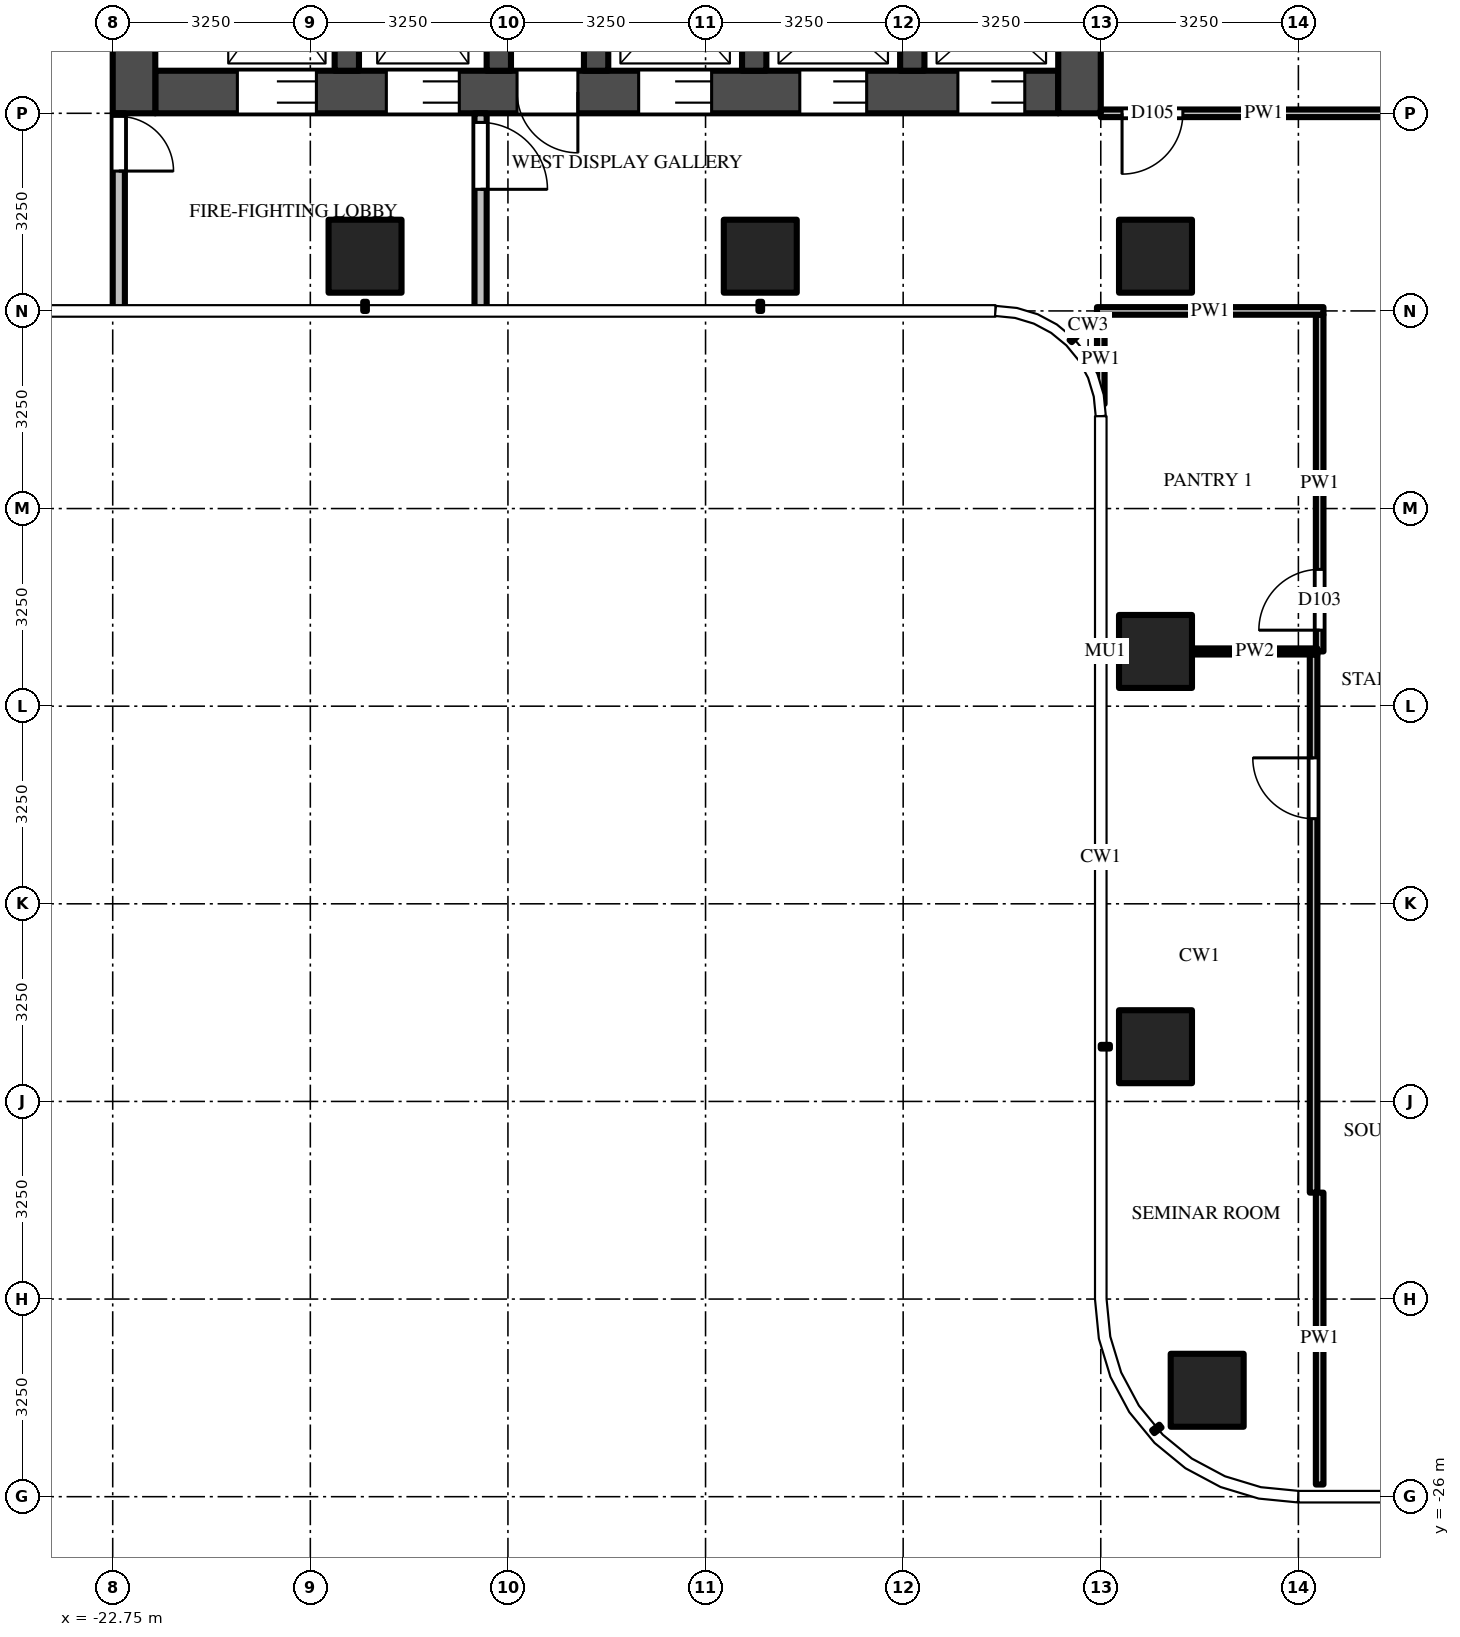
"""IFC4 building model, lengths in metres.
Left out: names, types, materials, properties, quantities, classifications, styles, units other than length and angle.
Written with IfcOpenShell. Run it as: python <this file> out.ifc"""

import sys

from ifc_helpers import new_model, si_unit, direction, frame, frame_2d, origin, origin_2d, place, context, subcontext, project, spatial, rectangle, extrude, source, transform, mapped, element, fill, save


model = new_model("IFC4")
c1 = context("Model", 3, precision=1e-05, world=origin(), true_north=direction((0.0, 1.0)))
c2 = subcontext(c1, "Body", "Model", "MODEL_VIEW")
j1 = project(units=[si_unit("LENGTHUNIT", "METRE"), si_unit("PLANEANGLEUNIT", "RADIAN")], contexts=[c1])
p1 = place(None, origin())
s1 = spatial("IfcSite", under=j1, at=p1, CompositionType="ELEMENT")
p2 = place(p1, origin())
s2 = spatial("IfcBuilding", under=s1, at=p2, CompositionType="ELEMENT")
p3 = place(p2, frame((0.0, 0.0, 165.9)))
s3 = spatial("IfcBuildingStorey", under=s2, at=p3, CompositionType="ELEMENT", Elevation=165.9)
m1 = source(origin(), c2, "Body", "SweptSolid", [
    extrude(rectangle(XDim=1.2, YDim=1.2, at=origin_2d()), origin(), (0.0, 0.0, 1.0), 3.9),
])
for number, where, z_axis, x_axis in (
    (1, (-5.6, -5.6, 0.0), (0.0, 0.0, 1.0), (1.0, 0.0, 0.0)),
    (2, (-5.6, -12.1, 0.0), (0.0, 0.0, 1.0), (1.0, 0.0, 0.0)),
    (3, (-5.6, -18.6, 0.0), (0.0, 0.0, 1.0), (1.0, 0.0, 0.0)),
    (4, (-4.75, -24.25, 0.0), (0.0, 0.0, 1.0), (1.0, 0.0, 0.0)),
    (5, (-12.1, -5.6, 0.0), (0.0, 0.0, 1.0), (1.0, 0.0, 0.0)),
    (6, (-18.6, -5.6, 0.0), (0.0, 0.0, 1.0), (1.0, 0.0, 0.0)),
):
    element("IfcColumn", number, at=place(p3, frame(where, z_axis=z_axis, x_axis=x_axis)), inside=s3, PredefinedType="COLUMN", context=c2, shape_type="MappedRepresentation", body=[
        mapped(m1, transform((0.0, 0.0, 0.0))),
    ])
m2 = source(origin(), c2, "Body", "SweptSolid", [
    extrude(rectangle(XDim=14.85, YDim=0.7, at=frame_2d((7.425, 0.0))), origin(), (0.0, 0.0, 1.0), 3.7),
])
p4 = place(p3, frame((-7.2, -2.9, 0.0), z_axis=(0.0, 0.0, 1.0), x_axis=(-1.0, 0.0, 0.0)))
e7 = element("IfcWall", 7, at=p4, inside=s3, PredefinedType="SHEAR", context=c2, shape_type="MappedRepresentation", body=[
    mapped(m2, transform((0.0, 0.0, 0.0))),
])
m3 = source(origin(), c2, "Body", "SweptSolid", [
    extrude(rectangle(XDim=1.1, YDim=2.1, at=frame_2d((0.55, 1.05))), frame((0.0, 0.36, 0.0), z_axis=(0.0, -1.0, 0.0), x_axis=(1.0, 0.0, 0.0)), (0.0, 0.0, 1.0), 0.72),
])
p5 = place(p4, frame((0.55, 0.0, 0.0)))
e8 = element("IfcOpeningElement", 8, at=p5, cuts=e7, PredefinedType="OPENING", context=c2, shape_type="MappedRepresentation", body=[
    mapped(m3, transform((0.0, 0.0, 0.0))),
])
p6 = place(p4, frame((3.15, 0.0, 0.0)))
e9 = element("IfcOpeningElement", 9, at=p6, cuts=e7, PredefinedType="OPENING", context=c2, shape_type="MappedRepresentation", body=[
    mapped(m3, transform((0.0, 0.0, 0.0))),
])
m4 = source(origin(), c2, "Body", "SweptSolid", [
    extrude(rectangle(XDim=1.2, YDim=2.1, at=frame_2d((0.6, 1.05))), frame((0.0, 0.36, 0.0), z_axis=(0.0, -1.0, 0.0), x_axis=(1.0, 0.0, 0.0)), (0.0, 0.0, 1.0), 0.72),
])
p7 = place(p4, frame((5.7, 0.0, 0.0)))
e10 = element("IfcOpeningElement", 10, at=p7, cuts=e7, PredefinedType="OPENING", context=c2, shape_type="MappedRepresentation", body=[
    mapped(m4, transform((0.0, 0.0, 0.0))),
])
m5 = source(origin(), c2, "Body", "SweptSolid", [
    extrude(rectangle(XDim=1.3, YDim=2.1, at=frame_2d((0.65, 1.05))), frame((0.0, 0.36, 0.0), z_axis=(0.0, -1.0, 0.0), x_axis=(1.0, 0.0, 0.0)), (0.0, 0.0, 1.0), 0.72),
])
p8 = place(p4, frame((12.2, 0.0, 0.0)))
e11 = element("IfcOpeningElement", 11, at=p8, cuts=e7, PredefinedType="OPENING", context=c2, shape_type="MappedRepresentation", body=[
    mapped(m5, transform((0.0, 0.0, 0.0))),
])
p9 = place(p4, frame((9.85, 0.0, 0.0)))
e12 = element("IfcOpeningElement", 12, at=p9, cuts=e7, PredefinedType="OPENING", context=c2, shape_type="MappedRepresentation", body=[
    mapped(m4, transform((0.0, 0.0, 0.0))),
])
m6 = source(origin(), c2, "Body", "SweptSolid", [
    extrude(rectangle(XDim=1.0, YDim=2.1, at=frame_2d((0.5, 1.05))), frame((0.0, 0.36, 0.0), z_axis=(0.0, -1.0, 0.0), x_axis=(1.0, 0.0, 0.0)), (0.0, 0.0, 1.0), 0.72),
])
p10 = place(p4, frame((7.9, 0.0, 0.0)))
e13 = element("IfcOpeningElement", 13, at=p10, cuts=e7, PredefinedType="OPENING", context=c2, shape_type="MappedRepresentation", body=[
    mapped(m6, transform((0.0, 0.0, 0.0))),
])
m7 = source(origin(), c2, "Body", "SweptSolid", [
    extrude(rectangle(XDim=9.05, YDim=0.7, at=frame_2d((4.525, 0.0))), origin(), (0.0, 0.0, 1.0), 3.7),
])
p11 = place(p3, frame((-6.85, 5.8, 0.0), z_axis=(0.0, 0.0, 1.0), x_axis=(0.0, -1.0, 0.0)))
e14 = element("IfcWall", 14, at=p11, inside=s3, PredefinedType="SHEAR", context=c2, shape_type="MappedRepresentation", body=[
    mapped(m7, transform((0.0, 0.0, 0.0))),
])
m8 = source(origin(), c2, "Body", "SweptSolid", [
    extrude(rectangle(XDim=1.8, YDim=2.1, at=frame_2d((0.9, 1.05))), frame((0.0, 0.36, 0.0), z_axis=(0.0, -1.0, 0.0), x_axis=(1.0, 0.0, 0.0)), (0.0, 0.0, 1.0), 0.72),
])
p12 = place(p11, frame((3.15, 0.0, 0.0)))
e15 = element("IfcOpeningElement", 15, at=p12, cuts=e14, PredefinedType="OPENING", context=c2, shape_type="MappedRepresentation", body=[
    mapped(m8, transform((0.0, 0.0, 0.0))),
])
p13 = place(p3, frame((-22.4, 5.8, 0.0), z_axis=(0.0, 0.0, 1.0), x_axis=(0.0, -1.0, 0.0)))
e16 = element("IfcWall", 16, at=p13, inside=s3, PredefinedType="SHEAR", context=c2, shape_type="MappedRepresentation", body=[
    mapped(m7, transform((0.0, 0.0, 0.0))),
])
m9 = source(origin(), c2, "Body", "SweptSolid", [
    extrude(rectangle(XDim=2.45, YDim=0.4, at=frame_2d((1.225, 0.0))), origin(), (0.0, 0.0, 1.0), 3.7),
])
for number, where, z_axis, x_axis in (
    (17, (-9.6, -0.1, 0.0), (0.0, 0.0, 1.0), (0.0, -1.0, 0.0)),
    (18, (-12.2, -0.1, 0.0), (0.0, 0.0, 1.0), (0.0, -1.0, 0.0)),
    (19, (-14.8, -0.1, 0.0), (0.0, 0.0, 1.0), (0.0, -1.0, 0.0)),
    (20, (-16.4, -0.1, 0.0), (0.0, 0.0, 1.0), (0.0, -1.0, 0.0)),
    (21, (-18.9, -0.1, 0.0), (0.0, 0.0, 1.0), (0.0, -1.0, 0.0)),
):
    element("IfcWall", number, at=place(p3, frame(where, z_axis=z_axis, x_axis=x_axis)), inside=s3, PredefinedType="SHEAR", context=c2, shape_type="MappedRepresentation", body=[
        mapped(m9, transform((0.0, 0.0, 0.0))),
    ])
m10 = source(origin(), c2, "Body", "SweptSolid", [
    extrude(rectangle(XDim=3.25, YDim=0.2, at=frame_2d((1.625, 0.0))), origin(), (0.0, 0.0, 1.0), 3.7),
])
p14 = place(p3, frame((-16.7, -3.25, 0.0), z_axis=(0.0, 0.0, 1.0), x_axis=(0.0, -1.0, 0.0)))
e22 = element("IfcWall", 22, at=p14, inside=s3, PredefinedType="PARTITIONING", context=c2, shape_type="MappedRepresentation", body=[
    mapped(m10, transform((0.0, 0.0, 0.0))),
])
m11 = source(origin(), c2, "Body", "SweptSolid", [
    extrude(rectangle(XDim=1.1, YDim=2.1, at=frame_2d((0.55, 1.05))), frame((0.0, 0.11, 0.0), z_axis=(0.0, -1.0, 0.0), x_axis=(1.0, 0.0, 0.0)), (0.0, 0.0, 1.0), 0.22),
])
p15 = place(p14, frame((0.15, 0.0, 0.0)))
e23 = element("IfcOpeningElement", 23, at=p15, cuts=e22, PredefinedType="OPENING", context=c2, shape_type="MappedRepresentation", body=[
    mapped(m11, transform((0.0, 0.0, 0.0))),
])
p16 = place(p3, frame((-22.65, -3.25, 0.0), z_axis=(0.0, 0.0, 1.0), x_axis=(0.0, -1.0, 0.0)))
e24 = element("IfcWall", 24, at=p16, inside=s3, PredefinedType="PARTITIONING", context=c2, shape_type="MappedRepresentation", body=[
    mapped(m10, transform((0.0, 0.0, 0.0))),
])
m12 = source(origin(), c2, "Body", "SweptSolid", [
    extrude(rectangle(XDim=0.9, YDim=2.1, at=frame_2d((0.45, 1.05))), frame((0.0, 0.11, 0.0), z_axis=(0.0, -1.0, 0.0), x_axis=(1.0, 0.0, 0.0)), (0.0, 0.0, 1.0), 0.22),
])
p17 = place(p16, frame((0.05, 0.0, 0.0)))
e25 = element("IfcOpeningElement", 25, at=p17, cuts=e24, PredefinedType="OPENING", context=c2, shape_type="MappedRepresentation", body=[
    mapped(m12, transform((0.0, 0.0, 0.0))),
])
m13 = source(origin(), c2, "Body", "SweptSolid", [
    extrude(rectangle(XDim=1.469, YDim=0.125, at=frame_2d((0.734, 0.0))), origin(), (0.0, 0.0, 1.0), 3.7),
])
p18 = place(p3, frame((-6.5, -6.562, 0.0), z_axis=(0.0, 0.0, 1.0), x_axis=(0.0, -1.0, 0.0)))
e26 = element("IfcWall", 26, at=p18, inside=s3, PredefinedType="PARTITIONING", context=c2, shape_type="MappedRepresentation", body=[
    mapped(m13, transform((0.0, 0.0, 0.0))),
])
m14 = source(origin(), c2, "Body", "SweptSolid", [
    extrude(rectangle(XDim=8.85, YDim=0.125, at=frame_2d((4.425, 0.0))), origin(), (0.0, 0.0, 1.0), 2.997),
])
p19 = place(p3, frame((-3.0, -21.0, 0.0), z_axis=(0.0, 0.0, 1.0), x_axis=(0.0, 1.0, 0.0)))
e27 = element("IfcWall", 27, at=p19, inside=s3, PredefinedType="PARTITIONING", context=c2, shape_type="MappedRepresentation", body=[
    mapped(m14, transform((0.0, 0.0, 0.0))),
])
m15 = source(origin(), c2, "Body", "SweptSolid", [
    extrude(rectangle(XDim=1.0, YDim=2.1, at=frame_2d((0.5, 1.05))), frame((0.0, 0.073, 0.0), z_axis=(0.0, -1.0, 0.0), x_axis=(1.0, 0.0, 0.0)), (0.0, 0.0, 1.0), 0.145),
])
p20 = place(p19, frame((6.15, 0.0, 0.0)))
e28 = element("IfcOpeningElement", 28, at=p20, cuts=e27, PredefinedType="OPENING", context=c2, shape_type="MappedRepresentation", body=[
    mapped(m15, transform((0.0, 0.0, 0.0))),
])
m16 = source(origin(), c2, "Body", "SweptSolid", [
    extrude(rectangle(XDim=4.8, YDim=0.125, at=frame_2d((2.4, 0.0))), origin(), (0.0, 0.0, 1.0), 2.78),
])
p21 = place(p3, frame((-2.9, -25.8, 0.0), z_axis=(0.0, 0.0, 1.0), x_axis=(0.0, 1.0, 0.0)))
e29 = element("IfcWall", 29, at=p21, inside=s3, PredefinedType="PARTITIONING", context=c2, shape_type="MappedRepresentation", body=[
    mapped(m16, transform((0.0, 0.0, 0.0))),
])
m17 = source(origin(), c2, "Body", "SweptSolid", [
    extrude(rectangle(XDim=5.538, YDim=0.125, at=frame_2d((2.769, 0.0))), origin(), (0.0, 0.0, 1.0), 2.997),
])
p22 = place(p3, frame((-2.9, -12.1, 0.0), z_axis=(0.0, 0.0, 1.0), x_axis=(0.0, 1.0, 0.0)))
e30 = element("IfcWall", 30, at=p22, inside=s3, PredefinedType="PARTITIONING", context=c2, shape_type="MappedRepresentation", body=[
    mapped(m17, transform((0.0, 0.0, 0.0))),
])
p23 = place(p22, frame((0.35, 0.0, 0.0)))
e31 = element("IfcOpeningElement", 31, at=p23, cuts=e30, PredefinedType="OPENING", context=c2, shape_type="MappedRepresentation", body=[
    mapped(m15, transform((0.0, 0.0, 0.0))),
])
m18 = source(origin(), c2, "Body", "SweptSolid", [
    extrude(rectangle(XDim=2.062, YDim=0.1, at=frame_2d((1.031, 0.0))), origin(), (0.0, 0.0, 1.0), 2.997),
])
p24 = place(p3, frame((-5.0, -12.1, 0.0), z_axis=(0.0, 0.0, 1.0), x_axis=(1.0, 0.0, 0.0)))
e32 = element("IfcWall", 32, at=p24, inside=s3, PredefinedType="PARTITIONING", context=c2, shape_type="MappedRepresentation", body=[
    mapped(m18, transform((0.0, 0.0, 0.0))),
])
m19 = source(origin(), c2, "Body", "SweptSolid", [
    extrude(rectangle(XDim=3.725, YDim=0.125, at=frame_2d((1.863, 0.0))), origin(), (0.0, 0.0, 1.0), 2.78),
])
p25 = place(p3, frame((-2.837, -6.5, 0.0), z_axis=(0.0, 0.0, 1.0), x_axis=(-1.0, 0.0, 0.0)))
e33 = element("IfcWall", 33, at=p25, inside=s3, PredefinedType="PARTITIONING", context=c2, shape_type="MappedRepresentation", body=[
    mapped(m19, transform((0.0, 0.0, 0.0))),
])
m20 = source(origin(), c2, "Body", "SweptSolid", [
    extrude(rectangle(XDim=5.363, YDim=0.125, at=frame_2d((2.681, 0.0))), origin(), (0.0, 0.0, 1.0), 2.997),
])
p26 = place(p3, frame((-1.137, -3.25, 0.0), z_axis=(0.0, 0.0, 1.0), x_axis=(-1.0, 0.0, 0.0)))
e34 = element("IfcWall", 34, at=p26, inside=s3, PredefinedType="PARTITIONING", context=c2, shape_type="MappedRepresentation", body=[
    mapped(m20, transform((0.0, 0.0, 0.0))),
])
p27 = place(p26, frame((4.012, 0.0, 0.0)))
e35 = element("IfcOpeningElement", 35, at=p27, cuts=e34, PredefinedType="OPENING", context=c2, shape_type="MappedRepresentation", body=[
    mapped(m15, transform((0.0, 0.0, 0.0))),
])
m21 = source(origin(), c2, "Body", "SweptSolid", [
    extrude(rectangle(XDim=1.1, YDim=2.1, at=frame_2d((0.55, 1.05))), frame((0.0, -0.275, 0.0), z_axis=(0.0, -1.0, 0.0), x_axis=(1.0, 0.0, 0.0)), (0.0, 0.0, 1.0), 0.05),
])
p28 = place(p5, origin())
e36 = element("IfcDoor", 36, at=p28, inside=s3, OperationType="DOUBLE_DOOR_SLIDING", PredefinedType="DOOR", context=c2, shape_type="MappedRepresentation", body=[
    mapped(m21, transform((0.0, 0.0, 0.0))),
])
fill(e8, e36)
p29 = place(p6, origin())
e37 = element("IfcDoor", 37, at=p29, inside=s3, OperationType="DOUBLE_DOOR_SLIDING", PredefinedType="DOOR", context=c2, shape_type="MappedRepresentation", body=[
    mapped(m21, transform((0.0, 0.0, 0.0))),
])
fill(e9, e37)
m22 = source(origin(), c2, "Body", "SweptSolid", [
    extrude(rectangle(XDim=1.2, YDim=2.1, at=frame_2d((0.6, 1.05))), frame((0.0, -0.275, 0.0), z_axis=(0.0, -1.0, 0.0), x_axis=(1.0, 0.0, 0.0)), (0.0, 0.0, 1.0), 0.05),
])
p30 = place(p7, origin())
e38 = element("IfcDoor", 38, at=p30, inside=s3, OperationType="DOUBLE_DOOR_SLIDING", PredefinedType="DOOR", context=c2, shape_type="MappedRepresentation", body=[
    mapped(m22, transform((0.0, 0.0, 0.0))),
])
fill(e10, e38)
m23 = source(origin(), c2, "Body", "SweptSolid", [
    extrude(rectangle(XDim=1.3, YDim=2.1, at=frame_2d((0.65, 1.05))), frame((0.0, -0.275, 0.0), z_axis=(0.0, -1.0, 0.0), x_axis=(1.0, 0.0, 0.0)), (0.0, 0.0, 1.0), 0.05),
])
p31 = place(p8, origin())
e39 = element("IfcDoor", 39, at=p31, inside=s3, OperationType="DOUBLE_DOOR_SLIDING", PredefinedType="DOOR", context=c2, shape_type="MappedRepresentation", body=[
    mapped(m23, transform((0.0, 0.0, 0.0))),
])
fill(e11, e39)
p32 = place(p9, origin())
e40 = element("IfcDoor", 40, at=p32, inside=s3, OperationType="DOUBLE_DOOR_SLIDING", PredefinedType="DOOR", context=c2, shape_type="MappedRepresentation", body=[
    mapped(m22, transform((0.0, 0.0, 0.0))),
])
fill(e12, e40)
m24 = source(origin(), c2, "Body", "SweptSolid", [
    extrude(rectangle(XDim=1.0, YDim=2.1, at=frame_2d((0.5, 1.05))), frame((0.0, -0.275, 0.0), z_axis=(0.0, -1.0, 0.0), x_axis=(1.0, 0.0, 0.0)), (0.0, 0.0, 1.0), 0.05),
])
p33 = place(p10, origin())
e41 = element("IfcDoor", 41, at=p33, inside=s3, OperationType="SINGLE_SWING_LEFT", PredefinedType="DOOR", context=c2, shape_type="MappedRepresentation", body=[
    mapped(m24, transform((0.0, 0.0, 0.0))),
])
fill(e13, e41)
m25 = source(origin(), c2, "Body", "SweptSolid", [
    extrude(rectangle(XDim=1.1, YDim=2.1, at=frame_2d((0.55, 1.05))), frame((0.0, 0.025, 0.0), z_axis=(0.0, -1.0, 0.0), x_axis=(1.0, 0.0, 0.0)), (0.0, 0.0, 1.0), 0.05),
])
p34 = place(p15, origin())
e42 = element("IfcDoor", 42, at=p34, inside=s3, OperationType="SINGLE_SWING_RIGHT", PredefinedType="DOOR", context=c2, shape_type="MappedRepresentation", body=[
    mapped(m25, transform((0.0, 0.0, 0.0))),
])
fill(e23, e42)
m26 = source(origin(), c2, "Body", "SweptSolid", [
    extrude(rectangle(XDim=0.9, YDim=2.1, at=frame_2d((0.45, 1.05))), frame((0.0, 0.025, 0.0), z_axis=(0.0, -1.0, 0.0), x_axis=(1.0, 0.0, 0.0)), (0.0, 0.0, 1.0), 0.05),
])
p35 = place(p17, origin())
e43 = element("IfcDoor", 43, at=p35, inside=s3, OperationType="SINGLE_SWING_RIGHT", PredefinedType="DOOR", context=c2, shape_type="MappedRepresentation", body=[
    mapped(m26, transform((0.0, 0.0, 0.0))),
])
fill(e25, e43)
m27 = source(origin(), c2, "Body", "SweptSolid", [
    extrude(rectangle(XDim=1.0, YDim=2.1, at=frame_2d((0.5, 1.05))), frame((0.0, 0.025, 0.0), z_axis=(0.0, -1.0, 0.0), x_axis=(1.0, 0.0, 0.0)), (0.0, 0.0, 1.0), 0.05),
])
p36 = place(p20, origin())
e44 = element("IfcDoor", 44, at=p36, inside=s3, OperationType="SINGLE_SWING_RIGHT", PredefinedType="DOOR", context=c2, shape_type="MappedRepresentation", body=[
    mapped(m27, transform((0.0, 0.0, 0.0))),
])
fill(e28, e44)
p37 = place(p23, origin())
e45 = element("IfcDoor", 45, at=p37, inside=s3, OperationType="SINGLE_SWING_LEFT", PredefinedType="DOOR", context=c2, shape_type="MappedRepresentation", body=[
    mapped(m27, transform((0.0, 0.0, 0.0))),
])
fill(e31, e45)
p38 = place(p27, origin())
e46 = element("IfcDoor", 46, at=p38, inside=s3, OperationType="SINGLE_SWING_RIGHT", PredefinedType="DOOR", context=c2, shape_type="MappedRepresentation", body=[
    mapped(m27, transform((0.0, 0.0, 0.0))),
])
fill(e35, e46)
save(model, sys.argv[1])
